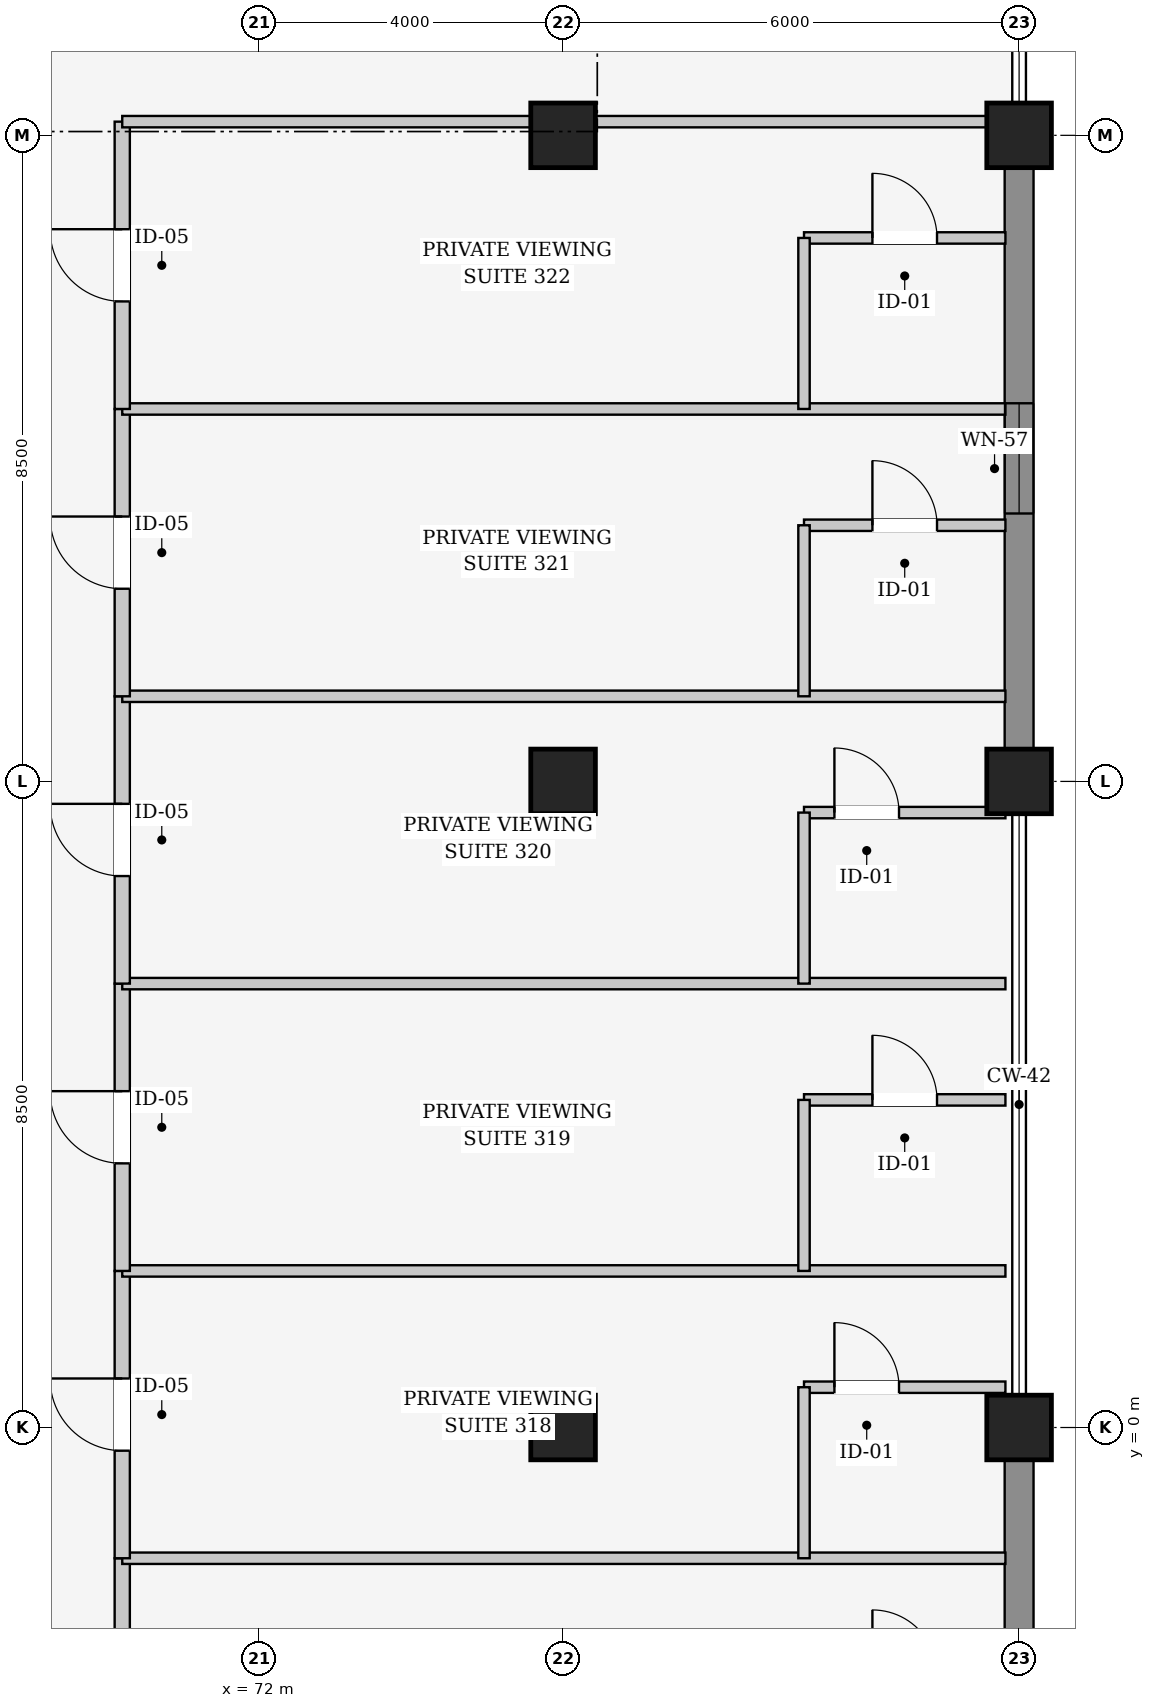
"""IFC4 building model, lengths in metres.
Left out: names, types, materials, properties, quantities, classifications, styles, units other than length and angle.
Written with IfcOpenShell. Run it as: python <this file> out.ifc"""

import sys

from ifc_helpers import new_model, si_unit, direction, frame, frame_2d, origin, origin_2d, place, context, subcontext, project, spatial, rectangle, extrude, element, fill, save


model = new_model("IFC4")
c1 = context("Model", 3, precision=1e-05, world=origin(), true_north=direction((0.0, 1.0)))
c2 = subcontext(c1, "Body", "Model", "MODEL_VIEW")
j1 = project(units=[si_unit("LENGTHUNIT", "METRE"), si_unit("PLANEANGLEUNIT", "RADIAN")], contexts=[c1])
p1 = place(None, origin())
s1 = spatial("IfcSite", under=j1, at=p1, CompositionType="ELEMENT")
p2 = place(p1, origin())
s2 = spatial("IfcBuilding", under=s1, at=p2, CompositionType="ELEMENT")
p3 = place(p2, frame((0.0, 0.0, 16.2)))
s3 = spatial("IfcBuildingStorey", under=s2, at=p3, CompositionType="ELEMENT", Elevation=16.2)
for number, where, z_axis, x_axis in (
    (1, (76.0, 0.0, 0.0), (0.0, 0.0, 1.0), (1.0, 0.0, 0.0)),
    (2, (76.0, 8.5, 0.0), (0.0, 0.0, 1.0), (1.0, 0.0, 0.0)),
    (3, (76.0, 17.0, 0.0), (0.0, 0.0, 1.0), (1.0, 0.0, 0.0)),
    (4, (82.0, 0.0, 0.0), (0.0, 0.0, 1.0), (1.0, 0.0, 0.0)),
    (5, (82.0, 8.5, 0.0), (0.0, 0.0, 1.0), (1.0, 0.0, 0.0)),
    (6, (82.0, 17.0, 0.0), (0.0, 0.0, 1.0), (1.0, 0.0, 0.0)),
):
    element("IfcColumn", number, at=place(p3, frame(where, z_axis=z_axis, x_axis=x_axis)), inside=s3, PredefinedType="COLUMN", context=c2, shape_type="SweptSolid", body=[
        extrude(rectangle(XDim=0.85, YDim=0.85, at=origin_2d()), origin(), (0.0, 0.0, 1.0), 4.8),
    ])
p4 = place(p3, frame((82.0, -0.407, 0.0), z_axis=(0.0, 0.0, 1.0), x_axis=(0.0, -1.0, 0.0)))
e7 = element("IfcWall", 7, at=p4, inside=s3, PredefinedType="SOLIDWALL", context=c2, shape_type="SweptSolid", body=[
    extrude(rectangle(XDim=7.686, YDim=0.38, at=frame_2d((3.843, 0.0))), origin(), (0.0, 0.0, 1.0), 3.76),
])
p5 = place(p4, frame((3.218, 0.0, 0.9)))
e8 = element("IfcOpeningElement", 8, at=p5, cuts=e7, PredefinedType="OPENING", context=c2, shape_type="SweptSolid", body=[
    extrude(rectangle(XDim=1.25, YDim=2.8, at=frame_2d((0.625, 1.4))), frame((0.0, 0.2, 0.0), z_axis=(0.0, -1.0, 0.0), x_axis=(1.0, 0.0, 0.0)), (0.0, 0.0, 1.0), 0.4),
])
p6 = place(p3, frame((82.0, 16.593, 0.0), z_axis=(0.0, 0.0, 1.0), x_axis=(0.0, -1.0, 0.0)))
e9 = element("IfcWall", 9, at=p6, inside=s3, PredefinedType="SOLIDWALL", context=c2, shape_type="SweptSolid", body=[
    extrude(rectangle(XDim=7.686, YDim=0.38, at=frame_2d((3.843, 0.0))), origin(), (0.0, 0.0, 1.0), 3.76),
])
p7 = place(p6, frame((3.118, 0.0, 0.9)))
e10 = element("IfcOpeningElement", 10, at=p7, cuts=e9, PredefinedType="OPENING", context=c2, shape_type="SweptSolid", body=[
    extrude(rectangle(XDim=1.45, YDim=2.8, at=frame_2d((0.725, 1.4))), frame((0.0, 0.2, 0.0), z_axis=(0.0, -1.0, 0.0), x_axis=(1.0, 0.0, 0.0)), (0.0, 0.0, 1.0), 0.4),
])
p8 = place(p3, frame((70.2, -5.5, 0.0), z_axis=(0.0, 0.0, 1.0), x_axis=(0.0, 1.0, 0.0)))
e11 = element("IfcWall", 11, at=p8, inside=s3, PredefinedType="PARTITIONING", context=c2, shape_type="SweptSolid", body=[
    extrude(rectangle(XDim=3.78, YDim=0.2, at=frame_2d((1.89, 0.0))), origin(), (0.0, 0.0, 1.0), 4.182),
])
p9 = place(p8, frame((1.415, 0.0, 0.0)))
e12 = element("IfcOpeningElement", 12, at=p9, cuts=e11, PredefinedType="OPENING", context=c2, shape_type="SweptSolid", body=[
    extrude(rectangle(XDim=0.95, YDim=2.25, at=frame_2d((0.475, 1.125))), frame((0.0, 0.11, 0.0), z_axis=(0.0, -1.0, 0.0), x_axis=(1.0, 0.0, 0.0)), (0.0, 0.0, 1.0), 0.22),
])
p10 = place(p3, frame((70.2, -1.72, 0.0), z_axis=(0.0, 0.0, 1.0), x_axis=(1.0, 0.0, 0.0)))
e13 = element("IfcWall", 13, at=p10, inside=s3, PredefinedType="PARTITIONING", context=c2, shape_type="SweptSolid", body=[
    extrude(rectangle(XDim=11.62, YDim=0.15, at=frame_2d((5.81, 0.0))), origin(), (0.0, 0.0, 1.0), 3.845),
])
p11 = place(p3, frame((79.17, 0.53, 0.0), z_axis=(0.0, 0.0, 1.0), x_axis=(1.0, 0.0, 0.0)))
e14 = element("IfcWall", 14, at=p11, inside=s3, PredefinedType="PARTITIONING", context=c2, shape_type="SweptSolid", body=[
    extrude(rectangle(XDim=2.65, YDim=0.15, at=frame_2d((1.325, 0.0))), origin(), (0.0, 0.0, 1.0), 3.845),
])
p12 = place(p11, frame((0.4, 0.0, 0.0)))
e15 = element("IfcOpeningElement", 15, at=p12, cuts=e14, PredefinedType="OPENING", context=c2, shape_type="SweptSolid", body=[
    extrude(rectangle(XDim=0.85, YDim=2.15, at=frame_2d((0.425, 1.075))), frame((0.0, 0.085, 0.0), z_axis=(0.0, -1.0, 0.0), x_axis=(1.0, 0.0, 0.0)), (0.0, 0.0, 1.0), 0.17),
])
p13 = place(p3, frame((79.17, -1.72, 0.0), z_axis=(0.0, 0.0, 1.0), x_axis=(0.0, 1.0, 0.0)))
e16 = element("IfcWall", 16, at=p13, inside=s3, PredefinedType="PARTITIONING", context=c2, shape_type="SweptSolid", body=[
    extrude(rectangle(XDim=2.25, YDim=0.15, at=frame_2d((1.125, 0.0))), origin(), (0.0, 0.0, 1.0), 3.745),
])
p14 = place(p3, frame((70.2, -1.72, 0.0), z_axis=(0.0, 0.0, 1.0), x_axis=(0.0, 1.0, 0.0)))
e17 = element("IfcWall", 17, at=p14, inside=s3, PredefinedType="PARTITIONING", context=c2, shape_type="SweptSolid", body=[
    extrude(rectangle(XDim=3.78, YDim=0.2, at=frame_2d((1.89, 0.0))), origin(), (0.0, 0.0, 1.0), 3.545),
])
p15 = place(p14, frame((1.415, 0.0, 0.0)))
e18 = element("IfcOpeningElement", 18, at=p15, cuts=e17, PredefinedType="OPENING", context=c2, shape_type="SweptSolid", body=[
    extrude(rectangle(XDim=0.95, YDim=2.25, at=frame_2d((0.475, 1.125))), frame((0.0, 0.11, 0.0), z_axis=(0.0, -1.0, 0.0), x_axis=(1.0, 0.0, 0.0)), (0.0, 0.0, 1.0), 0.22),
])
p16 = place(p3, frame((70.2, 2.06, 0.0), z_axis=(0.0, 0.0, 1.0), x_axis=(1.0, 0.0, 0.0)))
e19 = element("IfcWall", 19, at=p16, inside=s3, PredefinedType="PARTITIONING", context=c2, shape_type="SweptSolid", body=[
    extrude(rectangle(XDim=11.62, YDim=0.15, at=frame_2d((5.81, 0.0))), origin(), (0.0, 0.0, 1.0), 3.845),
])
p17 = place(p3, frame((79.17, 4.31, 0.0), z_axis=(0.0, 0.0, 1.0), x_axis=(1.0, 0.0, 0.0)))
e20 = element("IfcWall", 20, at=p17, inside=s3, PredefinedType="PARTITIONING", context=c2, shape_type="SweptSolid", body=[
    extrude(rectangle(XDim=2.65, YDim=0.15, at=frame_2d((1.325, 0.0))), origin(), (0.0, 0.0, 1.0), 3.845),
])
p18 = place(p17, frame((0.9, 0.0, 0.0)))
e21 = element("IfcOpeningElement", 21, at=p18, cuts=e20, PredefinedType="OPENING", context=c2, shape_type="SweptSolid", body=[
    extrude(rectangle(XDim=0.85, YDim=2.15, at=frame_2d((0.425, 1.075))), frame((0.0, 0.085, 0.0), z_axis=(0.0, -1.0, 0.0), x_axis=(1.0, 0.0, 0.0)), (0.0, 0.0, 1.0), 0.17),
])
p19 = place(p3, frame((79.17, 2.06, 0.0), z_axis=(0.0, 0.0, 1.0), x_axis=(0.0, 1.0, 0.0)))
e22 = element("IfcWall", 22, at=p19, inside=s3, PredefinedType="PARTITIONING", context=c2, shape_type="SweptSolid", body=[
    extrude(rectangle(XDim=2.25, YDim=0.15, at=frame_2d((1.125, 0.0))), origin(), (0.0, 0.0, 1.0), 4.182),
])
p20 = place(p3, frame((70.2, 2.06, 0.0), z_axis=(0.0, 0.0, 1.0), x_axis=(0.0, 1.0, 0.0)))
e23 = element("IfcWall", 23, at=p20, inside=s3, PredefinedType="PARTITIONING", context=c2, shape_type="SweptSolid", body=[
    extrude(rectangle(XDim=3.78, YDim=0.2, at=frame_2d((1.89, 0.0))), origin(), (0.0, 0.0, 1.0), 4.182),
])
p21 = place(p20, frame((1.415, 0.0, 0.0)))
e24 = element("IfcOpeningElement", 24, at=p21, cuts=e23, PredefinedType="OPENING", context=c2, shape_type="SweptSolid", body=[
    extrude(rectangle(XDim=0.95, YDim=2.25, at=frame_2d((0.475, 1.125))), frame((0.0, 0.11, 0.0), z_axis=(0.0, -1.0, 0.0), x_axis=(1.0, 0.0, 0.0)), (0.0, 0.0, 1.0), 0.22),
])
p22 = place(p3, frame((70.2, 5.84, 0.0), z_axis=(0.0, 0.0, 1.0), x_axis=(1.0, 0.0, 0.0)))
e25 = element("IfcWall", 25, at=p22, inside=s3, PredefinedType="PARTITIONING", context=c2, shape_type="SweptSolid", body=[
    extrude(rectangle(XDim=11.62, YDim=0.15, at=frame_2d((5.81, 0.0))), origin(), (0.0, 0.0, 1.0), 3.845),
])
p23 = place(p3, frame((79.17, 8.09, 0.0), z_axis=(0.0, 0.0, 1.0), x_axis=(1.0, 0.0, 0.0)))
e26 = element("IfcWall", 26, at=p23, inside=s3, PredefinedType="PARTITIONING", context=c2, shape_type="SweptSolid", body=[
    extrude(rectangle(XDim=2.65, YDim=0.15, at=frame_2d((1.325, 0.0))), origin(), (0.0, 0.0, 1.0), 3.745),
])
p24 = place(p23, frame((0.4, 0.0, 0.0)))
e27 = element("IfcOpeningElement", 27, at=p24, cuts=e26, PredefinedType="OPENING", context=c2, shape_type="SweptSolid", body=[
    extrude(rectangle(XDim=0.85, YDim=2.15, at=frame_2d((0.425, 1.075))), frame((0.0, 0.085, 0.0), z_axis=(0.0, -1.0, 0.0), x_axis=(1.0, 0.0, 0.0)), (0.0, 0.0, 1.0), 0.17),
])
p25 = place(p3, frame((79.17, 5.84, 0.0), z_axis=(0.0, 0.0, 1.0), x_axis=(0.0, 1.0, 0.0)))
e28 = element("IfcWall", 28, at=p25, inside=s3, PredefinedType="PARTITIONING", context=c2, shape_type="SweptSolid", body=[
    extrude(rectangle(XDim=2.25, YDim=0.15, at=frame_2d((1.125, 0.0))), origin(), (0.0, 0.0, 1.0), 3.745),
])
p26 = place(p3, frame((70.2, 5.84, 0.0), z_axis=(0.0, 0.0, 1.0), x_axis=(0.0, 1.0, 0.0)))
e29 = element("IfcWall", 29, at=p26, inside=s3, PredefinedType="PARTITIONING", context=c2, shape_type="SweptSolid", body=[
    extrude(rectangle(XDim=3.78, YDim=0.2, at=frame_2d((1.89, 0.0))), origin(), (0.0, 0.0, 1.0), 3.545),
])
p27 = place(p26, frame((1.415, 0.0, 0.0)))
e30 = element("IfcOpeningElement", 30, at=p27, cuts=e29, PredefinedType="OPENING", context=c2, shape_type="SweptSolid", body=[
    extrude(rectangle(XDim=0.95, YDim=2.25, at=frame_2d((0.475, 1.125))), frame((0.0, 0.11, 0.0), z_axis=(0.0, -1.0, 0.0), x_axis=(1.0, 0.0, 0.0)), (0.0, 0.0, 1.0), 0.22),
])
p28 = place(p3, frame((70.2, 9.62, 0.0), z_axis=(0.0, 0.0, 1.0), x_axis=(1.0, 0.0, 0.0)))
e31 = element("IfcWall", 31, at=p28, inside=s3, PredefinedType="PARTITIONING", context=c2, shape_type="SweptSolid", body=[
    extrude(rectangle(XDim=11.62, YDim=0.15, at=frame_2d((5.81, 0.0))), origin(), (0.0, 0.0, 1.0), 3.845),
])
p29 = place(p3, frame((79.17, 11.87, 0.0), z_axis=(0.0, 0.0, 1.0), x_axis=(1.0, 0.0, 0.0)))
e32 = element("IfcWall", 32, at=p29, inside=s3, PredefinedType="PARTITIONING", context=c2, shape_type="SweptSolid", body=[
    extrude(rectangle(XDim=2.65, YDim=0.15, at=frame_2d((1.325, 0.0))), origin(), (0.0, 0.0, 1.0), 3.845),
])
p30 = place(p29, frame((0.9, 0.0, 0.0)))
e33 = element("IfcOpeningElement", 33, at=p30, cuts=e32, PredefinedType="OPENING", context=c2, shape_type="SweptSolid", body=[
    extrude(rectangle(XDim=0.85, YDim=2.15, at=frame_2d((0.425, 1.075))), frame((0.0, 0.085, 0.0), z_axis=(0.0, -1.0, 0.0), x_axis=(1.0, 0.0, 0.0)), (0.0, 0.0, 1.0), 0.17),
])
p31 = place(p3, frame((79.17, 9.62, 0.0), z_axis=(0.0, 0.0, 1.0), x_axis=(0.0, 1.0, 0.0)))
e34 = element("IfcWall", 34, at=p31, inside=s3, PredefinedType="PARTITIONING", context=c2, shape_type="SweptSolid", body=[
    extrude(rectangle(XDim=2.25, YDim=0.15, at=frame_2d((1.125, 0.0))), origin(), (0.0, 0.0, 1.0), 4.44),
])
p32 = place(p3, frame((70.2, 9.62, 0.0), z_axis=(0.0, 0.0, 1.0), x_axis=(0.0, 1.0, 0.0)))
e35 = element("IfcWall", 35, at=p32, inside=s3, PredefinedType="PARTITIONING", context=c2, shape_type="SweptSolid", body=[
    extrude(rectangle(XDim=3.78, YDim=0.2, at=frame_2d((1.89, 0.0))), origin(), (0.0, 0.0, 1.0), 4.182),
])
p33 = place(p32, frame((1.415, 0.0, 0.0)))
e36 = element("IfcOpeningElement", 36, at=p33, cuts=e35, PredefinedType="OPENING", context=c2, shape_type="SweptSolid", body=[
    extrude(rectangle(XDim=0.95, YDim=2.25, at=frame_2d((0.475, 1.125))), frame((0.0, 0.11, 0.0), z_axis=(0.0, -1.0, 0.0), x_axis=(1.0, 0.0, 0.0)), (0.0, 0.0, 1.0), 0.22),
])
p34 = place(p3, frame((70.2, 13.4, 0.0), z_axis=(0.0, 0.0, 1.0), x_axis=(1.0, 0.0, 0.0)))
e37 = element("IfcWall", 37, at=p34, inside=s3, PredefinedType="PARTITIONING", context=c2, shape_type="SweptSolid", body=[
    extrude(rectangle(XDim=11.62, YDim=0.15, at=frame_2d((5.81, 0.0))), origin(), (0.0, 0.0, 1.0), 3.845),
])
p35 = place(p3, frame((79.17, 15.65, 0.0), z_axis=(0.0, 0.0, 1.0), x_axis=(1.0, 0.0, 0.0)))
e38 = element("IfcWall", 38, at=p35, inside=s3, PredefinedType="PARTITIONING", context=c2, shape_type="SweptSolid", body=[
    extrude(rectangle(XDim=2.65, YDim=0.15, at=frame_2d((1.325, 0.0))), origin(), (0.0, 0.0, 1.0), 3.845),
])
p36 = place(p35, frame((0.9, 0.0, 0.0)))
e39 = element("IfcOpeningElement", 39, at=p36, cuts=e38, PredefinedType="OPENING", context=c2, shape_type="SweptSolid", body=[
    extrude(rectangle(XDim=0.85, YDim=2.15, at=frame_2d((0.425, 1.075))), frame((0.0, 0.085, 0.0), z_axis=(0.0, -1.0, 0.0), x_axis=(1.0, 0.0, 0.0)), (0.0, 0.0, 1.0), 0.17),
])
p37 = place(p3, frame((79.17, 13.4, 0.0), z_axis=(0.0, 0.0, 1.0), x_axis=(0.0, 1.0, 0.0)))
e40 = element("IfcWall", 40, at=p37, inside=s3, PredefinedType="PARTITIONING", context=c2, shape_type="SweptSolid", body=[
    extrude(rectangle(XDim=2.25, YDim=0.15, at=frame_2d((1.125, 0.0))), origin(), (0.0, 0.0, 1.0), 4.44),
])
p38 = place(p3, frame((70.2, 13.4, 0.0), z_axis=(0.0, 0.0, 1.0), x_axis=(0.0, 1.0, 0.0)))
e41 = element("IfcWall", 41, at=p38, inside=s3, PredefinedType="PARTITIONING", context=c2, shape_type="SweptSolid", body=[
    extrude(rectangle(XDim=3.78, YDim=0.2, at=frame_2d((1.89, 0.0))), origin(), (0.0, 0.0, 1.0), 3.545),
])
p39 = place(p38, frame((1.415, 0.0, 0.0)))
e42 = element("IfcOpeningElement", 42, at=p39, cuts=e41, PredefinedType="OPENING", context=c2, shape_type="SweptSolid", body=[
    extrude(rectangle(XDim=0.95, YDim=2.25, at=frame_2d((0.475, 1.125))), frame((0.0, 0.11, 0.0), z_axis=(0.0, -1.0, 0.0), x_axis=(1.0, 0.0, 0.0)), (0.0, 0.0, 1.0), 0.22),
])
p40 = place(p3, frame((70.2, 17.18, 0.0), z_axis=(0.0, 0.0, 1.0), x_axis=(1.0, 0.0, 0.0)))
e43 = element("IfcWall", 43, at=p40, inside=s3, PredefinedType="PARTITIONING", context=c2, shape_type="SweptSolid", body=[
    extrude(rectangle(XDim=11.62, YDim=0.15, at=frame_2d((5.81, 0.0))), origin(), (0.0, 0.0, 1.0), 3.545),
])
p41 = place(p7, origin())
e44 = element("IfcWindow", 44, at=p41, inside=s3, PartitioningType="SINGLE_PANEL", PredefinedType="WINDOW", context=c2, shape_type="SweptSolid", body=[
    extrude(rectangle(XDim=1.45, YDim=2.8, at=frame_2d((0.725, 1.4))), frame((0.0, 0.03, 0.0), z_axis=(0.0, -1.0, 0.0), x_axis=(1.0, 0.0, 0.0)), (0.0, 0.0, 1.0), 0.06),
])
fill(e10, e44)
p42 = place(p12, origin())
e45 = element("IfcDoor", 45, at=p42, inside=s3, OperationType="SINGLE_SWING_LEFT", PredefinedType="DOOR", context=c2, shape_type="SweptSolid", body=[
    extrude(rectangle(XDim=0.85, YDim=2.15, at=frame_2d((0.425, 1.075))), frame((0.0, 0.025, 0.0), z_axis=(0.0, -1.0, 0.0), x_axis=(1.0, 0.0, 0.0)), (0.0, 0.0, 1.0), 0.05),
])
fill(e15, e45)
p43 = place(p15, origin())
e46 = element("IfcDoor", 46, at=p43, inside=s3, OperationType="SINGLE_SWING_RIGHT", PredefinedType="DOOR", context=c2, shape_type="SweptSolid", body=[
    extrude(rectangle(XDim=0.95, YDim=2.25, at=frame_2d((0.475, 1.125))), frame((0.0, 0.025, 0.0), z_axis=(0.0, -1.0, 0.0), x_axis=(1.0, 0.0, 0.0)), (0.0, 0.0, 1.0), 0.05),
])
fill(e18, e46)
p44 = place(p18, origin())
e47 = element("IfcDoor", 47, at=p44, inside=s3, OperationType="SINGLE_SWING_LEFT", PredefinedType="DOOR", context=c2, shape_type="SweptSolid", body=[
    extrude(rectangle(XDim=0.85, YDim=2.15, at=frame_2d((0.425, 1.075))), frame((0.0, 0.025, 0.0), z_axis=(0.0, -1.0, 0.0), x_axis=(1.0, 0.0, 0.0)), (0.0, 0.0, 1.0), 0.05),
])
fill(e21, e47)
p45 = place(p21, origin())
e48 = element("IfcDoor", 48, at=p45, inside=s3, OperationType="SINGLE_SWING_RIGHT", PredefinedType="DOOR", context=c2, shape_type="SweptSolid", body=[
    extrude(rectangle(XDim=0.95, YDim=2.25, at=frame_2d((0.475, 1.125))), frame((0.0, 0.025, 0.0), z_axis=(0.0, -1.0, 0.0), x_axis=(1.0, 0.0, 0.0)), (0.0, 0.0, 1.0), 0.05),
])
fill(e24, e48)
p46 = place(p24, origin())
e49 = element("IfcDoor", 49, at=p46, inside=s3, OperationType="SINGLE_SWING_LEFT", PredefinedType="DOOR", context=c2, shape_type="SweptSolid", body=[
    extrude(rectangle(XDim=0.85, YDim=2.15, at=frame_2d((0.425, 1.075))), frame((0.0, 0.025, 0.0), z_axis=(0.0, -1.0, 0.0), x_axis=(1.0, 0.0, 0.0)), (0.0, 0.0, 1.0), 0.05),
])
fill(e27, e49)
p47 = place(p27, origin())
e50 = element("IfcDoor", 50, at=p47, inside=s3, OperationType="SINGLE_SWING_RIGHT", PredefinedType="DOOR", context=c2, shape_type="SweptSolid", body=[
    extrude(rectangle(XDim=0.95, YDim=2.25, at=frame_2d((0.475, 1.125))), frame((0.0, 0.025, 0.0), z_axis=(0.0, -1.0, 0.0), x_axis=(1.0, 0.0, 0.0)), (0.0, 0.0, 1.0), 0.05),
])
fill(e30, e50)
p48 = place(p30, origin())
e51 = element("IfcDoor", 51, at=p48, inside=s3, OperationType="SINGLE_SWING_LEFT", PredefinedType="DOOR", context=c2, shape_type="SweptSolid", body=[
    extrude(rectangle(XDim=0.85, YDim=2.15, at=frame_2d((0.425, 1.075))), frame((0.0, 0.025, 0.0), z_axis=(0.0, -1.0, 0.0), x_axis=(1.0, 0.0, 0.0)), (0.0, 0.0, 1.0), 0.05),
])
fill(e33, e51)
p49 = place(p33, origin())
e52 = element("IfcDoor", 52, at=p49, inside=s3, OperationType="SINGLE_SWING_RIGHT", PredefinedType="DOOR", context=c2, shape_type="SweptSolid", body=[
    extrude(rectangle(XDim=0.95, YDim=2.25, at=frame_2d((0.475, 1.125))), frame((0.0, 0.025, 0.0), z_axis=(0.0, -1.0, 0.0), x_axis=(1.0, 0.0, 0.0)), (0.0, 0.0, 1.0), 0.05),
])
fill(e36, e52)
p50 = place(p36, origin())
e53 = element("IfcDoor", 53, at=p50, inside=s3, OperationType="SINGLE_SWING_LEFT", PredefinedType="DOOR", context=c2, shape_type="SweptSolid", body=[
    extrude(rectangle(XDim=0.85, YDim=2.15, at=frame_2d((0.425, 1.075))), frame((0.0, 0.025, 0.0), z_axis=(0.0, -1.0, 0.0), x_axis=(1.0, 0.0, 0.0)), (0.0, 0.0, 1.0), 0.05),
])
fill(e39, e53)
p51 = place(p39, origin())
e54 = element("IfcDoor", 54, at=p51, inside=s3, OperationType="SINGLE_SWING_RIGHT", PredefinedType="DOOR", context=c2, shape_type="SweptSolid", body=[
    extrude(rectangle(XDim=0.95, YDim=2.25, at=frame_2d((0.475, 1.125))), frame((0.0, 0.025, 0.0), z_axis=(0.0, -1.0, 0.0), x_axis=(1.0, 0.0, 0.0)), (0.0, 0.0, 1.0), 0.05),
])
fill(e42, e54)
save(model, sys.argv[1])
